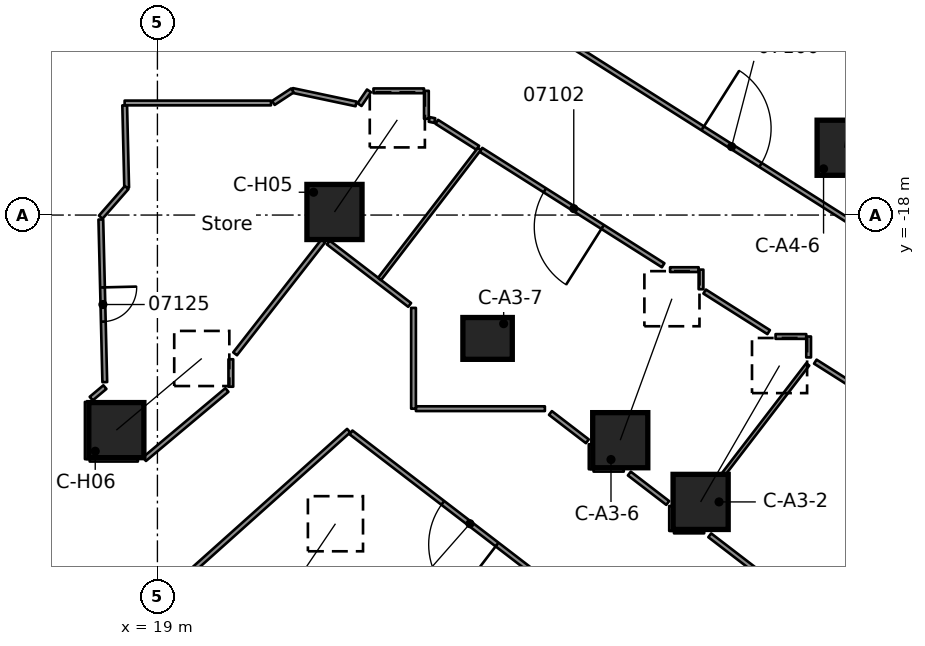
"""IFC4 building model, lengths in metres.
Left out: names, types, materials, properties, quantities, classifications, styles, units other than length and angle.
Written with IfcOpenShell. Run it as: python <this file> out.ifc"""

import sys

from ifc_helpers import new_model, si_unit, direction, frame, frame_2d, origin, origin_2d, place, context, subcontext, project, spatial, rectangle, extrude, element, fill, save


model = new_model("IFC4")
c1 = context("Model", 3, precision=1e-05, world=origin(), true_north=direction((0.0, 1.0)))
c2 = subcontext(c1, "Body", "Model", "MODEL_VIEW")
j1 = project(units=[si_unit("LENGTHUNIT", "METRE"), si_unit("PLANEANGLEUNIT", "RADIAN")], contexts=[c1])
p1 = place(None, origin())
s1 = spatial("IfcSite", under=j1, at=p1, CompositionType="ELEMENT")
p2 = place(p1, origin())
s2 = spatial("IfcBuilding", under=s1, at=p2, CompositionType="ELEMENT")
p3 = place(p2, frame((0.0, 0.0, 33.3)))
s3 = spatial("IfcBuildingStorey", under=s2, at=p3, CompositionType="ELEMENT", Elevation=33.3)
p4 = place(p3, frame((21.783, -28.941, 0.552), z_axis=(0.425847814082, 0.631092139827, 0.648364365376), x_axis=(-0.828933559632, 0.559347078044, 0.0)))
e1 = element("IfcColumn", 1, at=p4, inside=s3, PredefinedType="COLUMN", context=c2, shape_type="SweptSolid", body=[
    extrude(rectangle(XDim=1.45, YDim=1.45, at=origin_2d()), origin(), (0.0, 0.0, 1.0), 4.467),
])
p5 = place(p3, frame((33.294, -25.548, 0.601), z_axis=(0.415263925558, 0.717340610475, 0.559444653825), x_axis=(-0.865446442826, 0.501001451695, 0.0)))
e2 = element("IfcColumn", 2, at=p5, inside=s3, PredefinedType="COLUMN", context=c2, shape_type="SweptSolid", body=[
    extrude(rectangle(XDim=1.45, YDim=1.45, at=origin_2d()), origin(), (0.0, 0.0, 1.0), 5.002),
])
p6 = place(p3, frame((31.179, -23.924, 0.591), z_axis=(0.279657049767, 0.765530427024, 0.579443784862), x_axis=(-0.939287067036, 0.343132344292, 0.0)))
e3 = element("IfcColumn", 3, at=p6, inside=s3, PredefinedType="COLUMN", context=c2, shape_type="SweptSolid", body=[
    extrude(rectangle(XDim=1.45, YDim=1.45, at=origin_2d()), origin(), (0.0, 0.0, 1.0), 4.864),
])
p7 = place(p3, frame((27.688, -21.246, 0.0), z_axis=(0.0, 0.0, 1.0), x_axis=(1.0, 0.0, 0.0)))
e4 = element("IfcColumn", 4, at=p7, inside=s3, PredefinedType="COLUMN", context=c2, shape_type="SweptSolid", body=[
    extrude(rectangle(XDim=1.3, YDim=1.1, at=origin_2d()), origin(), (0.0, 0.0, 1.0), 4.0),
])
p8 = place(p3, frame((37.084, -16.229, 0.609), z_axis=(0.111371211993, 0.832593849041, 0.54257159498), x_axis=(-0.991171870731, 0.132583266936, 0.0)))
e5 = element("IfcColumn", 5, at=p8, inside=s3, PredefinedType="COLUMN", context=c2, shape_type="SweptSolid", body=[
    extrude(rectangle(XDim=1.45, YDim=1.45, at=origin_2d()), origin(), (0.0, 0.0, 1.0), 5.127),
])
p9 = place(p3, frame((23.659, -17.919, 0.508), z_axis=(0.395280825563, 0.579239562537, 0.712905742812), x_axis=(-0.825998448397, 0.563672389997, 0.0)))
e6 = element("IfcColumn", 6, at=p9, inside=s3, PredefinedType="COLUMN", context=c2, shape_type="SweptSolid", body=[
    extrude(rectangle(XDim=1.45, YDim=1.45, at=origin_2d()), origin(), (0.0, 0.0, 1.0), 4.185),
])
p10 = place(p3, frame((17.919, -23.659, 0.508), z_axis=(0.537268679687, 0.450505155937, 0.713012952408), x_axis=(-0.642522431446, 0.766266875891, 0.0)))
e7 = element("IfcColumn", 7, at=p10, inside=s3, PredefinedType="COLUMN", context=c2, shape_type="SweptSolid", body=[
    extrude(rectangle(XDim=1.45, YDim=1.45, at=origin_2d()), origin(), (0.0, 0.0, 1.0), 4.184),
])
p11 = place(p3, frame((17.511, -18.117, 0.0), z_axis=(0.0, 0.0, 1.0), x_axis=(0.024298181428, -0.999704755605, 0.0)))
e8 = element("IfcWall", 8, at=p11, inside=s3, PredefinedType="PARTITIONING", context=c2, shape_type="SweptSolid", body=[
    extrude(rectangle(XDim=4.28, YDim=0.125, at=frame_2d((2.14, 0.0))), origin(), (0.0, 0.0, 1.0), 3.56),
])
p12 = place(p11, frame((1.788, 0.0, 0.0)))
e9 = element("IfcOpeningElement", 9, at=p12, cuts=e8, PredefinedType="OPENING", context=c2, shape_type="SweptSolid", body=[
    extrude(rectangle(XDim=0.9, YDim=2.1, at=frame_2d((0.45, 1.05))), frame((0.0, 0.073, 0.0), z_axis=(0.0, -1.0, 0.0), x_axis=(1.0, 0.0, 0.0)), (0.0, 0.0, 1.0), 0.145),
])
p13 = place(p3, frame((18.139, -15.113, 0.0), z_axis=(0.0, 0.0, 1.0), x_axis=(0.024036399243, -0.999711084019, 0.0)))
e10 = element("IfcWall", 10, at=p13, inside=s3, PredefinedType="PARTITIONING", context=c2, shape_type="SweptSolid", body=[
    extrude(rectangle(XDim=2.164, YDim=0.125, at=frame_2d((1.082, 0.0))), origin(), (0.0, 0.0, 1.0), 3.56),
])
p14 = place(p3, frame((37.331, -33.877, 0.0), z_axis=(0.0, 0.0, 1.0), x_axis=(-0.793351723993, 0.608763535404, 0.0)))
e11 = element("IfcWall", 11, at=p14, inside=s3, PredefinedType="PARTITIONING", context=c2, shape_type="SweptSolid", body=[
    extrude(rectangle(XDim=16.686, YDim=0.125, at=frame_2d((8.343, 0.0))), origin(), (0.0, 0.0, 1.0), 3.56),
])
p15 = place(p14, frame((11.84, 0.0, 0.0)))
e12 = element("IfcOpeningElement", 12, at=p15, cuts=e11, PredefinedType="OPENING", context=c2, shape_type="SweptSolid", body=[
    extrude(rectangle(XDim=1.8, YDim=2.1, at=frame_2d((0.9, 1.05))), frame((0.0, 0.073, 0.0), z_axis=(0.0, -1.0, 0.0), x_axis=(1.0, 0.0, 0.0)), (0.0, 0.0, 1.0), 0.145),
])
p16 = place(p14, frame((3.166, 0.0, 0.0)))
e13 = element("IfcOpeningElement", 13, at=p16, cuts=e11, PredefinedType="OPENING", context=c2, shape_type="SweptSolid", body=[
    extrude(rectangle(XDim=1.8, YDim=2.1, at=frame_2d((0.9, 1.05))), frame((0.0, 0.073, 0.0), z_axis=(0.0, -1.0, 0.0), x_axis=(1.0, 0.0, 0.0)), (0.0, 0.0, 1.0), 0.145),
])
p17 = place(p3, frame((25.637, -20.365, 0.0), z_axis=(0.0, 0.0, 1.0), x_axis=(-0.79329611627, 0.608835997548, 0.0)))
e14 = element("IfcWall", 14, at=p17, inside=s3, PredefinedType="PARTITIONING", context=c2, shape_type="SweptSolid", body=[
    extrude(rectangle(XDim=2.699, YDim=0.125, at=frame_2d((1.349, 0.0))), origin(), (0.0, 0.0, 1.0), 3.56),
])
p18 = place(p3, frame((29.342, -23.208, 0.0), z_axis=(0.0, 0.0, 1.0), x_axis=(0.793416873322, -0.608678622204, 0.0)))
e15 = element("IfcWall", 15, at=p18, inside=s3, PredefinedType="PARTITIONING", context=c2, shape_type="SweptSolid", body=[
    extrude(rectangle(XDim=1.224, YDim=0.125, at=frame_2d((0.612, 0.0))), origin(), (0.0, 0.0, 1.0), 3.56),
])
p19 = place(p3, frame((31.418, -24.801, 0.0), z_axis=(0.0, 0.0, 1.0), x_axis=(0.793393328304, -0.608709312071, 0.0)))
e16 = element("IfcWall", 16, at=p19, inside=s3, PredefinedType="PARTITIONING", context=c2, shape_type="SweptSolid", body=[
    extrude(rectangle(XDim=1.273, YDim=0.125, at=frame_2d((0.636, 0.0))), origin(), (0.0, 0.0, 1.0), 3.56),
])
p20 = place(p3, frame((33.534, -26.426, 0.0), z_axis=(0.0, 0.0, 1.0), x_axis=(0.793385739593, -0.60871920309, 0.0)))
e17 = element("IfcWall", 17, at=p20, inside=s3, PredefinedType="PARTITIONING", context=c2, shape_type="SweptSolid", body=[
    extrude(rectangle(XDim=7.572, YDim=0.125, at=frame_2d((3.786, 0.0))), origin(), (0.0, 0.0, 1.0), 3.56),
])
p21 = place(p20, frame((3.166, 0.0, 0.0)))
e18 = element("IfcOpeningElement", 18, at=p21, cuts=e17, PredefinedType="OPENING", context=c2, shape_type="SweptSolid", body=[
    extrude(rectangle(XDim=1.1, YDim=2.1, at=frame_2d((0.55, 1.05))), frame((0.0, 0.073, 0.0), z_axis=(0.0, -1.0, 0.0), x_axis=(1.0, 0.0, 0.0)), (0.0, 0.0, 1.0), 0.145),
])
p22 = place(p3, frame((32.308, -19.321, 0.0), z_axis=(0.0, 0.0, 1.0), x_axis=(-0.844784712182, 0.535106335287, 0.0)))
e19 = element("IfcWall", 19, at=p22, inside=s3, PredefinedType="PARTITIONING", context=c2, shape_type="SweptSolid", body=[
    extrude(rectangle(XDim=5.674, YDim=0.125, at=frame_2d((2.837, 0.0))), origin(), (0.0, 0.0, 1.0), 3.56),
])
p23 = place(p22, frame((1.885, 0.0, 0.0)))
e20 = element("IfcOpeningElement", 20, at=p23, cuts=e19, PredefinedType="OPENING", context=c2, shape_type="SweptSolid", body=[
    extrude(rectangle(XDim=1.8, YDim=2.1, at=frame_2d((0.9, 1.05))), frame((0.0, 0.073, 0.0), z_axis=(0.0, -1.0, 0.0), x_axis=(1.0, 0.0, 0.0)), (0.0, 0.0, 1.0), 0.145),
])
p24 = place(p3, frame((33.4, -20.013, 0.0), z_axis=(0.0, 0.0, 1.0), x_axis=(0.844693587084, -0.53525016949, 0.0)))
e21 = element("IfcWall", 21, at=p24, inside=s3, PredefinedType="PARTITIONING", context=c2, shape_type="SweptSolid", body=[
    extrude(rectangle(XDim=1.994, YDim=0.125, at=frame_2d((0.997, 0.0))), origin(), (0.0, 0.0, 1.0), 3.56),
])
p25 = place(p3, frame((36.312, -21.857, 0.0), z_axis=(0.0, 0.0, 1.0), x_axis=(0.844684518411, -0.535264480755, 0.0)))
e22 = element("IfcWall", 22, at=p25, inside=s3, PredefinedType="PARTITIONING", context=c2, shape_type="SweptSolid", body=[
    extrude(rectangle(XDim=7.055, YDim=0.125, at=frame_2d((3.527, 0.0))), origin(), (0.0, 0.0, 1.0), 3.56),
])
p26 = place(p3, frame((26.351, -15.547, 0.0), z_axis=(0.0, 0.0, 1.0), x_axis=(0.84483922118, -0.535020270976, 0.0)))
e23 = element("IfcWall", 23, at=p26, inside=s3, PredefinedType="PARTITIONING", context=c2, shape_type="SweptSolid", body=[
    extrude(rectangle(XDim=1.278, YDim=0.125, at=frame_2d((0.639, 0.0))), origin(), (0.0, 0.0, 1.0), 3.56),
])
p27 = place(p3, frame((29.716, -13.418, 0.0), z_axis=(0.0, 0.0, 1.0), x_axis=(0.844839535243, -0.535019775047, 0.0)))
e24 = element("IfcWall", 24, at=p27, inside=s3, PredefinedType="PARTITIONING", context=c2, shape_type="SweptSolid", body=[
    extrude(rectangle(XDim=10.248, YDim=0.125, at=frame_2d((5.124, 0.0))), origin(), (0.0, 0.0, 1.0), 3.56),
])
p28 = place(p27, frame((4.3, 0.0, 0.0)))
e25 = element("IfcOpeningElement", 25, at=p28, cuts=e24, PredefinedType="OPENING", context=c2, shape_type="SweptSolid", body=[
    extrude(rectangle(XDim=1.8, YDim=2.1, at=frame_2d((0.9, 1.05))), frame((0.0, 0.073, 0.0), z_axis=(0.0, -1.0, 0.0), x_axis=(1.0, 0.0, 0.0)), (0.0, 0.0, 1.0), 0.145),
])
p29 = place(p3, frame((22.553, -14.721, 0.0), z_axis=(0.0, 0.0, 1.0), x_axis=(0.978249040896, -0.207433878586, 0.0)))
e26 = element("IfcWall", 26, at=p29, inside=s3, PredefinedType="PARTITIONING", context=c2, shape_type="SweptSolid", body=[
    extrude(rectangle(XDim=1.711, YDim=0.125, at=frame_2d((0.855, 0.0))), origin(), (0.0, 0.0, 1.0), 3.56),
])
p30 = place(p3, frame((26.153, -15.484, 0.0), z_axis=(0.0, 0.0, 1.0), x_axis=(0.979226570581, -0.202769138353, 0.0)))
e27 = element("IfcWall", 27, at=p30, inside=s3, PredefinedType="PARTITIONING", context=c2, shape_type="SweptSolid", body=[
    extrude(rectangle(XDim=0.148, YDim=0.125, at=frame_2d((0.074, 0.0))), origin(), (0.0, 0.0, 1.0), 3.56),
])
for number, where, z_axis, x_axis in (
    (28, (32.593, -26.312, 0.0), (0.0, 0.0, 1.0), (1.0, 0.0, 0.0)),
    (29, (30.477, -24.688, 0.0), (0.0, 0.0, 1.0), (1.0, 0.0, 0.0)),
):
    element("IfcWall", number, at=place(p3, frame(where, z_axis=z_axis, x_axis=x_axis)), inside=s3, PredefinedType="PARTITIONING", context=c2, shape_type="SweptSolid", body=[
        extrude(rectangle(XDim=0.795, YDim=0.125, at=frame_2d((0.397, 0.0))), origin(), (0.0, 0.0, 1.0), 3.56),
    ])
p31 = place(p3, frame((17.218, -24.423, 0.0), z_axis=(0.0, 0.0, 1.0), x_axis=(1.0, 0.0, 0.0)))
e30 = element("IfcWall", 30, at=p31, inside=s3, PredefinedType="PARTITIONING", context=c2, shape_type="SweptSolid", body=[
    extrude(rectangle(XDim=1.268, YDim=0.125, at=frame_2d((0.634, 0.0))), origin(), (0.0, 0.0, 1.0), 3.56),
])
p32 = place(p3, frame((25.802, -23.095, 0.0), z_axis=(0.0, 0.0, 1.0), x_axis=(1.0, 0.0, 0.0)))
e31 = element("IfcWall", 31, at=p32, inside=s3, PredefinedType="PARTITIONING", context=c2, shape_type="SweptSolid", body=[
    extrude(rectangle(XDim=3.394, YDim=0.125, at=frame_2d((1.697, 0.0))), origin(), (0.0, 0.0, 1.0), 3.56),
])
p33 = place(p3, frame((35.266, -21.195, 0.0), z_axis=(0.0, 0.0, 1.0), x_axis=(1.0, 0.0, 0.0)))
e32 = element("IfcWall", 32, at=p33, inside=s3, PredefinedType="PARTITIONING", context=c2, shape_type="SweptSolid", body=[
    extrude(rectangle(XDim=0.808, YDim=0.125, at=frame_2d((0.404, 0.0))), origin(), (0.0, 0.0, 1.0), 3.56),
])
p34 = place(p3, frame((32.49, -19.436, 0.0), z_axis=(0.0, 0.0, 1.0), x_axis=(1.0, 0.0, 0.0)))
e33 = element("IfcWall", 33, at=p34, inside=s3, PredefinedType="PARTITIONING", context=c2, shape_type="SweptSolid", body=[
    extrude(rectangle(XDim=0.752, YDim=0.125, at=frame_2d((0.376, 0.0))), origin(), (0.0, 0.0, 1.0), 3.56),
])
p35 = place(p3, frame((18.137, -15.051, 0.0), z_axis=(0.0, 0.0, 1.0), x_axis=(1.0, 0.0, 0.0)))
e34 = element("IfcWall", 34, at=p35, inside=s3, PredefinedType="PARTITIONING", context=c2, shape_type="SweptSolid", body=[
    extrude(rectangle(XDim=3.851, YDim=0.125, at=frame_2d((1.926, 0.0))), origin(), (0.0, 0.0, 1.0), 3.56),
])
p36 = place(p3, frame((24.685, -14.731, 0.0), z_axis=(0.0, 0.0, 1.0), x_axis=(1.0, 0.0, 0.0)))
e35 = element("IfcWall", 35, at=p36, inside=s3, PredefinedType="PARTITIONING", context=c2, shape_type="SweptSolid", body=[
    extrude(rectangle(XDim=1.33, YDim=0.125, at=frame_2d((0.665, 0.0))), origin(), (0.0, 0.0, 1.0), 3.56),
])
p37 = place(p3, frame((17.509, -18.055, 0.0), z_axis=(0.0, 0.0, 1.0), x_axis=(0.658621462255, 0.752474431098, 0.0)))
e36 = element("IfcWall", 36, at=p37, inside=s3, PredefinedType="PARTITIONING", context=c2, shape_type="SweptSolid", body=[
    extrude(rectangle(XDim=1.035, YDim=0.125, at=frame_2d((0.518, 0.0))), origin(), (0.0, 0.0, 1.0), 3.56),
])
p38 = place(p3, frame((19.772, -27.484, 0.0), z_axis=(0.0, 0.0, 1.0), x_axis=(0.74538650379, 0.666632552436, 0.0)))
e37 = element("IfcWall", 37, at=p38, inside=s3, PredefinedType="PARTITIONING", context=c2, shape_type="SweptSolid", body=[
    extrude(rectangle(XDim=5.717, YDim=0.125, at=frame_2d((2.858, 0.0))), origin(), (0.0, 0.0, 1.0), 3.56),
])
p39 = place(p3, frame((18.658, -24.423, 0.0), z_axis=(0.0, 0.0, 1.0), x_axis=(0.76634618158, 0.642427840288, 0.0)))
e38 = element("IfcWall", 38, at=p39, inside=s3, PredefinedType="PARTITIONING", context=c2, shape_type="SweptSolid", body=[
    extrude(rectangle(XDim=2.833, YDim=0.125, at=frame_2d((1.417, 0.0))), origin(), (0.0, 0.0, 1.0), 3.56),
])
p40 = place(p3, frame((17.258, -22.83, 0.0), z_axis=(0.0, 0.0, 1.0), x_axis=(0.764978484878, 0.644055834283, 0.0)))
e39 = element("IfcWall", 39, at=p40, inside=s3, PredefinedType="PARTITIONING", context=c2, shape_type="SweptSolid", body=[
    extrude(rectangle(XDim=0.47, YDim=0.125, at=frame_2d((0.235, 0.0))), origin(), (0.0, 0.0, 1.0), 3.56),
])
p41 = place(p3, frame((21.044, -21.651, 0.0), z_axis=(0.0, 0.0, 1.0), x_axis=(0.615694374495, 0.787985048853, 0.0)))
e40 = element("IfcWall", 40, at=p41, inside=s3, PredefinedType="PARTITIONING", context=c2, shape_type="SweptSolid", body=[
    extrude(rectangle(XDim=3.765, YDim=0.125, at=frame_2d((1.883, 0.0))), origin(), (0.0, 0.0, 1.0), 3.56),
])
p42 = place(p3, frame((32.821, -26.219, 0.0), z_axis=(0.0, 0.0, 1.0), x_axis=(0.608776494461, 0.793341779936, 0.0)))
e41 = element("IfcWall", 41, at=p42, inside=s3, PredefinedType="PARTITIONING", context=c2, shape_type="SweptSolid", body=[
    extrude(rectangle(XDim=5.407, YDim=0.1, at=frame_2d((2.704, 0.0))), origin(), (0.0, 0.0, 1.0), 3.56),
])
p43 = place(p3, frame((24.847, -19.68, 0.0), z_axis=(0.0, 0.0, 1.0), x_axis=(0.60880221693, 0.793322040953, 0.0)))
e42 = element("IfcWall", 42, at=p43, inside=s3, PredefinedType="PARTITIONING", context=c2, shape_type="SweptSolid", body=[
    extrude(rectangle(XDim=4.313, YDim=0.1, at=frame_2d((2.157, 0.0))), origin(), (0.0, 0.0, 1.0), 3.56),
])
p44 = place(p3, frame((24.319, -15.095, 0.0), z_axis=(0.0, 0.0, 1.0), x_axis=(0.562734556466, 0.826637658808, 0.0)))
e43 = element("IfcWall", 43, at=p44, inside=s3, PredefinedType="PARTITIONING", context=c2, shape_type="SweptSolid", body=[
    extrude(rectangle(XDim=0.44, YDim=0.125, at=frame_2d((0.22, 0.0))), origin(), (0.0, 0.0, 1.0), 3.56),
])
p45 = place(p3, frame((36.136, -21.746, 0.0), z_axis=(0.0, 0.0, 1.0), x_axis=(0.0, 1.0, 0.0)))
e44 = element("IfcWall", 44, at=p45, inside=s3, PredefinedType="PARTITIONING", context=c2, shape_type="SweptSolid", body=[
    extrude(rectangle(XDim=0.551, YDim=0.125, at=frame_2d((0.275, 0.0))), origin(), (0.0, 0.0, 1.0), 3.56),
])
p46 = place(p3, frame((33.304, -19.952, 0.0), z_axis=(0.0, 0.0, 1.0), x_axis=(0.0, 1.0, 0.0)))
e45 = element("IfcWall", 45, at=p46, inside=s3, PredefinedType="PARTITIONING", context=c2, shape_type="SweptSolid", body=[
    extrude(rectangle(XDim=0.516, YDim=0.125, at=frame_2d((0.258, 0.0))), origin(), (0.0, 0.0, 1.0), 3.56),
])
for number, where, z_axis, x_axis in (
    (46, (32.53, -26.312, 0.0), (0.0, 0.0, 1.0), (0.0, 1.0, 0.0)),
    (47, (30.414, -24.688, 0.0), (0.0, 0.0, 1.0), (0.0, 1.0, 0.0)),
):
    element("IfcWall", number, at=place(p3, frame(where, z_axis=z_axis, x_axis=x_axis)), inside=s3, PredefinedType="PARTITIONING", context=c2, shape_type="SweptSolid", body=[
        extrude(rectangle(XDim=0.658, YDim=0.125, at=frame_2d((0.329, 0.0))), origin(), (0.0, 0.0, 1.0), 3.56),
    ])
p47 = place(p3, frame((26.078, -15.468, 0.0), z_axis=(0.0, 0.0, 1.0), x_axis=(0.0, 1.0, 0.0)))
e48 = element("IfcWall", 48, at=p47, inside=s3, PredefinedType="PARTITIONING", context=c2, shape_type="SweptSolid", body=[
    extrude(rectangle(XDim=0.737, YDim=0.125, at=frame_2d((0.369, 0.0))), origin(), (0.0, 0.0, 1.0), 3.56),
])
p48 = place(p3, frame((25.739, -23.095, 0.0), z_axis=(0.0, 0.0, 1.0), x_axis=(0.0, 1.0, 0.0)))
e49 = element("IfcWall", 49, at=p48, inside=s3, PredefinedType="PARTITIONING", context=c2, shape_type="SweptSolid", body=[
    extrude(rectangle(XDim=2.652, YDim=0.125, at=frame_2d((1.326, 0.0))), origin(), (0.0, 0.0, 1.0), 3.56),
])
p49 = place(p3, frame((22.051, -15.05, 0.0), z_axis=(0.0, 0.0, 1.0), x_axis=(0.836281057999, 0.548301004953, 0.0)))
e50 = element("IfcWall", 50, at=p49, inside=s3, PredefinedType="PARTITIONING", context=c2, shape_type="SweptSolid", body=[
    extrude(rectangle(XDim=0.6, YDim=0.125, at=frame_2d((0.3, 0.0))), origin(), (0.0, 0.0, 1.0), 3.56),
])
p50 = place(p3, frame((20.932, -22.517, 0.0), z_axis=(0.0, 0.0, 1.0), x_axis=(0.0, 1.0, 0.0)))
e51 = element("IfcWall", 51, at=p50, inside=s3, PredefinedType="PARTITIONING", context=c2, shape_type="SweptSolid", body=[
    extrude(rectangle(XDim=0.723, YDim=0.125, at=frame_2d((0.362, 0.0))), origin(), (0.0, 0.0, 1.0), 3.56),
])
p51 = place(p3, frame((17.155, -24.423, 0.0), z_axis=(0.0, 0.0, 1.0), x_axis=(0.0, 1.0, 0.0)))
e52 = element("IfcWall", 52, at=p51, inside=s3, PredefinedType="PARTITIONING", context=c2, shape_type="SweptSolid", body=[
    extrude(rectangle(XDim=1.507, YDim=0.125, at=frame_2d((0.753, 0.0))), origin(), (0.0, 0.0, 1.0), 3.56),
])
p52 = place(p28, origin())
e53 = element("IfcDoor", 53, at=p52, inside=s3, OperationType="DOUBLE_DOOR_SINGLE_SWING", PredefinedType="DOOR", context=c2, shape_type="SweptSolid", body=[
    extrude(rectangle(XDim=1.8, YDim=2.1, at=frame_2d((0.9, 1.05))), frame((0.0, 0.025, 0.0), z_axis=(0.0, -1.0, 0.0), x_axis=(1.0, 0.0, 0.0)), (0.0, 0.0, 1.0), 0.05),
])
fill(e25, e53)
p53 = place(p23, origin())
e54 = element("IfcDoor", 54, at=p53, inside=s3, OperationType="DOUBLE_DOOR_SINGLE_SWING", PredefinedType="DOOR", context=c2, shape_type="SweptSolid", body=[
    extrude(rectangle(XDim=1.8, YDim=2.1, at=frame_2d((0.9, 1.05))), frame((0.0, 0.025, 0.0), z_axis=(0.0, -1.0, 0.0), x_axis=(1.0, 0.0, 0.0)), (0.0, 0.0, 1.0), 0.05),
])
fill(e20, e54)
p54 = place(p15, origin())
e55 = element("IfcDoor", 55, at=p54, inside=s3, OperationType="DOUBLE_DOOR_SINGLE_SWING", PredefinedType="DOOR", context=c2, shape_type="SweptSolid", body=[
    extrude(rectangle(XDim=1.8, YDim=2.1, at=frame_2d((0.9, 1.05))), frame((0.0, 0.025, 0.0), z_axis=(0.0, -1.0, 0.0), x_axis=(1.0, 0.0, 0.0)), (0.0, 0.0, 1.0), 0.05),
])
fill(e12, e55)
p55 = place(p12, origin())
e56 = element("IfcDoor", 56, at=p55, inside=s3, OperationType="SINGLE_SWING_RIGHT", PredefinedType="DOOR", context=c2, shape_type="SweptSolid", body=[
    extrude(rectangle(XDim=0.9, YDim=2.1, at=frame_2d((0.45, 1.05))), frame((0.0, 0.025, 0.0), z_axis=(0.0, -1.0, 0.0), x_axis=(1.0, 0.0, 0.0)), (0.0, 0.0, 1.0), 0.05),
])
fill(e9, e56)
save(model, sys.argv[1])
